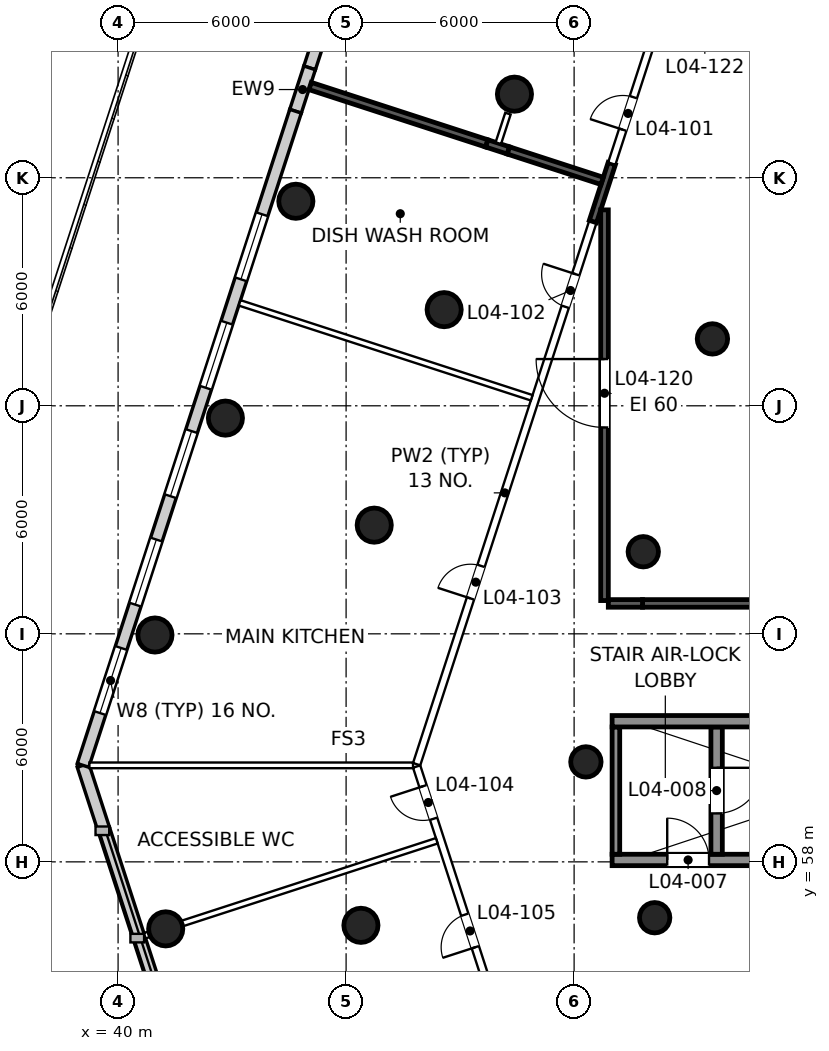
"""IFC4 building model, lengths in metres.
Left out: names, types, materials, properties, quantities, classifications, styles, units other than length and angle.
Written with IfcOpenShell. Run it as: python <this file> out.ifc"""

import sys

from ifc_helpers import new_model, si_unit, direction, frame, frame_2d, origin, origin_2d, place, context, subcontext, project, spatial, rectangle, circle, extrude, element, fill, save


model = new_model("IFC4")
c1 = context("Model", 3, precision=1e-05, world=origin(), true_north=direction((0.0, 1.0)))
c2 = subcontext(c1, "Body", "Model", "MODEL_VIEW")
j1 = project(units=[si_unit("LENGTHUNIT", "METRE"), si_unit("PLANEANGLEUNIT", "RADIAN")], contexts=[c1])
p1 = place(None, origin())
s1 = spatial("IfcSite", under=j1, at=p1, CompositionType="ELEMENT")
p2 = place(p1, origin())
s2 = spatial("IfcBuilding", under=s1, at=p2, CompositionType="ELEMENT")
p3 = place(p2, frame((0.0, 0.0, 29.0)))
s3 = spatial("IfcBuildingStorey", under=s2, at=p3, CompositionType="ELEMENT", Elevation=29.0)
for number, where, z_axis, x_axis in (
    (1, (46.39, 56.33, 0.0), (0.0, 0.0, 1.0), (1.0, 0.0, 0.0)),
    (2, (50.43, 78.2, 0.0), (0.0, 0.0, 1.0), (1.0, 0.0, 0.0)),
    (3, (48.58, 72.53, 0.0), (0.0, 0.0, 1.0), (1.0, 0.0, 0.0)),
    (4, (46.74, 66.86, 0.0), (0.0, 0.0, 1.0), (1.0, 0.0, 0.0)),
):
    element("IfcColumn", number, at=place(p3, frame(where, z_axis=z_axis, x_axis=x_axis)), inside=s3, PredefinedType="COLUMN", context=c2, shape_type="SweptSolid", body=[
        extrude(circle(Radius=0.45, at=origin_2d()), origin(), (0.0, 0.0, 1.0), 5.0),
    ])
for number, where, z_axis, x_axis in (
    (5, (52.31, 60.63, 0.0), (0.0, 0.0, 1.0), (1.0, 0.0, 0.0)),
    (6, (54.12, 56.53, 0.0), (0.0, 0.0, 1.0), (1.0, 0.0, 0.0)),
    (7, (55.64, 71.76, 0.0), (0.0, 0.0, 1.0), (1.0, 0.0, 0.0)),
    (8, (53.82, 66.16, 0.0), (0.0, 0.0, 1.0), (1.0, 0.0, 0.0)),
):
    element("IfcColumn", number, at=place(p3, frame(where, z_axis=z_axis, x_axis=x_axis)), inside=s3, PredefinedType="COLUMN", context=c2, shape_type="SweptSolid", body=[
        extrude(circle(Radius=0.4, at=origin_2d()), origin(), (0.0, 0.0, 1.0), 5.0),
    ])
for number, where, z_axis, x_axis in (
    (9, (41.253, 56.237, 0.0), (0.0, 0.0, 1.0), (1.0, 0.0, 0.0)),
    (10, (44.678, 75.382, 0.0), (0.0, 0.0, 1.0), (1.0, 0.0, 0.0)),
    (11, (42.824, 69.676, 0.0), (0.0, 0.0, 1.0), (1.0, 0.0, 0.0)),
    (12, (40.97, 63.969, 0.0), (0.0, 0.0, 1.0), (1.0, 0.0, 0.0)),
):
    element("IfcColumn", number, at=place(p3, frame(where, z_axis=z_axis, x_axis=x_axis)), inside=s3, PredefinedType="COLUMN", context=c2, shape_type="SweptSolid", body=[
        extrude(circle(Radius=0.45, at=origin_2d()), origin(), (0.0, 0.0, 1.0), 5.0),
    ])
p4 = place(p3, frame((39.077, 60.539, 0.0), z_axis=(0.0, 0.0, 1.0), x_axis=(0.309036002497, -0.951050339972, 0.0)))
e13 = element("IfcWall", 13, at=p4, inside=s3, PredefinedType="SOLIDWALL", context=c2, shape_type="SweptSolid", body=[
    extrude(rectangle(XDim=1.764, YDim=0.32, at=frame_2d((0.882, 0.0))), origin(), (0.0, 0.0, 1.0), 4.65),
])
p5 = place(p3, frame((39.622, 58.861, 0.0), z_axis=(0.0, 0.0, 1.0), x_axis=(0.309000197986, -0.951061973609, 0.0)))
e14 = element("IfcWall", 14, at=p5, inside=s3, PredefinedType="SOLIDWALL", context=c2, shape_type="SweptSolid", body=[
    extrude(rectangle(XDim=9.0, YDim=0.32, at=frame_2d((4.5, 0.0))), origin(), (0.0, 0.0, 1.0), 0.9),
])
p6 = place(p3, frame((47.017, 84.976, 0.0), z_axis=(0.0, 0.0, 1.0), x_axis=(-0.309028251378, -0.9510528586, 0.0)))
e15 = element("IfcWall", 15, at=p6, inside=s3, PredefinedType="SOLIDWALL", context=c2, shape_type="SweptSolid", body=[
    extrude(rectangle(XDim=6.397, YDim=0.32, at=frame_2d((3.198, 0.0))), origin(), (0.0, 0.0, 1.0), 4.65),
])
p7 = place(p6, frame((1.447, 0.0, 0.9)))
e16 = element("IfcOpeningElement", 16, at=p7, cuts=e15, PredefinedType="OPENING", context=c2, shape_type="SweptSolid", body=[
    extrude(rectangle(XDim=1.8, YDim=2.1, at=frame_2d((0.9, 1.05))), frame((0.0, 0.17, 0.0), z_axis=(0.0, -1.0, 0.0), x_axis=(1.0, 0.0, 0.0)), (0.0, 0.0, 1.0), 0.34),
])
p8 = place(p3, frame((45.04, 78.892, 0.0), z_axis=(0.0, 0.0, 1.0), x_axis=(-0.309017071679, -0.951056491178, 0.0)))
e17 = element("IfcWall", 17, at=p8, inside=s3, PredefinedType="SOLIDWALL", context=c2, shape_type="SweptSolid", body=[
    extrude(rectangle(XDim=1.2, YDim=0.32, at=frame_2d((0.6, 0.0))), origin(), (0.0, 0.0, 1.0), 4.65),
])
p9 = place(p3, frame((44.669, 77.751, 0.0), z_axis=(0.0, 0.0, 1.0), x_axis=(-0.309010726546, -0.951058552813, 0.0)))
e18 = element("IfcWall", 18, at=p9, inside=s3, PredefinedType="SOLIDWALL", context=c2, shape_type="SweptSolid", body=[
    extrude(rectangle(XDim=18.097, YDim=0.32, at=frame_2d((9.049, 0.0))), origin(), (0.0, 0.0, 1.0), 4.65),
])
p10 = place(p9, frame((2.85, 0.0, 0.9)))
e19 = element("IfcOpeningElement", 19, at=p10, cuts=e18, PredefinedType="OPENING", context=c2, shape_type="SweptSolid", body=[
    extrude(rectangle(XDim=1.8, YDim=2.1, at=frame_2d((0.9, 1.05))), frame((0.0, 0.17, 0.0), z_axis=(0.0, -1.0, 0.0), x_axis=(1.0, 0.0, 0.0)), (0.0, 0.0, 1.0), 0.34),
])
p11 = place(p9, frame((5.85, 0.0, 0.9)))
e20 = element("IfcOpeningElement", 20, at=p11, cuts=e18, PredefinedType="OPENING", context=c2, shape_type="SweptSolid", body=[
    extrude(rectangle(XDim=1.8, YDim=2.1, at=frame_2d((0.9, 1.05))), frame((0.0, 0.17, 0.0), z_axis=(0.0, -1.0, 0.0), x_axis=(1.0, 0.0, 0.0)), (0.0, 0.0, 1.0), 0.34),
])
p12 = place(p9, frame((8.85, 0.0, 0.9)))
e21 = element("IfcOpeningElement", 21, at=p12, cuts=e18, PredefinedType="OPENING", context=c2, shape_type="SweptSolid", body=[
    extrude(rectangle(XDim=1.8, YDim=2.1, at=frame_2d((0.9, 1.05))), frame((0.0, 0.17, 0.0), z_axis=(0.0, -1.0, 0.0), x_axis=(1.0, 0.0, 0.0)), (0.0, 0.0, 1.0), 0.34),
])
p13 = place(p9, frame((11.85, 0.0, 0.9)))
e22 = element("IfcOpeningElement", 22, at=p13, cuts=e18, PredefinedType="OPENING", context=c2, shape_type="SweptSolid", body=[
    extrude(rectangle(XDim=1.8, YDim=2.1, at=frame_2d((0.9, 1.05))), frame((0.0, 0.17, 0.0), z_axis=(0.0, -1.0, 0.0), x_axis=(1.0, 0.0, 0.0)), (0.0, 0.0, 1.0), 0.34),
])
p14 = place(p9, frame((14.85, 0.0, 0.9)))
e23 = element("IfcOpeningElement", 23, at=p14, cuts=e18, PredefinedType="OPENING", context=c2, shape_type="SweptSolid", body=[
    extrude(rectangle(XDim=1.8, YDim=2.1, at=frame_2d((0.9, 1.05))), frame((0.0, 0.17, 0.0), z_axis=(0.0, -1.0, 0.0), x_axis=(1.0, 0.0, 0.0)), (0.0, 0.0, 1.0), 0.34),
])
p15 = place(p3, frame((53.0, 58.05, 0.0), z_axis=(0.0, 0.0, 1.0), x_axis=(1.0, 0.0, 0.0)))
e24 = element("IfcWall", 24, at=p15, inside=s3, PredefinedType="SHEAR", context=c2, shape_type="SweptSolid", body=[
    extrude(rectangle(XDim=11.9, YDim=0.3, at=frame_2d((5.95, 0.0))), origin(), (0.0, 0.0, 1.0), 5.0),
])
p16 = place(p15, frame((1.45, 0.0, 0.0)))
e25 = element("IfcOpeningElement", 25, at=p16, cuts=e24, PredefinedType="OPENING", context=c2, shape_type="SweptSolid", body=[
    extrude(rectangle(XDim=1.1, YDim=2.1, at=frame_2d((0.55, 1.05))), frame((0.0, 0.16, 0.0), z_axis=(0.0, -1.0, 0.0), x_axis=(1.0, 0.0, 0.0)), (0.0, 0.0, 1.0), 0.32),
])
p17 = place(p3, frame((53.1, 58.2, 0.0), z_axis=(0.0, 0.0, 1.0), x_axis=(0.0, 1.0, 0.0)))
e26 = element("IfcWall", 26, at=p17, inside=s3, PredefinedType="SHEAR", context=c2, shape_type="SweptSolid", body=[
    extrude(rectangle(XDim=3.35, YDim=0.2, at=frame_2d((1.675, 0.0))), origin(), (0.0, 0.0, 1.0), 5.0),
])
p18 = place(p3, frame((55.75, 58.2, 0.0), z_axis=(0.0, 0.0, 1.0), x_axis=(0.0, 1.0, 0.0)))
e27 = element("IfcWall", 27, at=p18, inside=s3, PredefinedType="SHEAR", context=c2, shape_type="SweptSolid", body=[
    extrude(rectangle(XDim=3.35, YDim=0.3, at=frame_2d((1.675, 0.0))), origin(), (0.0, 0.0, 1.0), 5.0),
])
p19 = place(p18, frame((1.075, 0.0, 0.0)))
e28 = element("IfcOpeningElement", 28, at=p19, cuts=e27, PredefinedType="OPENING", context=c2, shape_type="SweptSolid", body=[
    extrude(rectangle(XDim=1.2, YDim=2.1, at=frame_2d((0.6, 1.05))), frame((0.0, 0.16, 0.0), z_axis=(0.0, -1.0, 0.0), x_axis=(1.0, 0.0, 0.0)), (0.0, 0.0, 1.0), 0.32),
])
p20 = place(p3, frame((53.0, 61.7, 0.0), z_axis=(0.0, 0.0, 1.0), x_axis=(1.0, 0.0, 0.0)))
e29 = element("IfcWall", 29, at=p20, inside=s3, PredefinedType="SHEAR", context=c2, shape_type="SweptSolid", body=[
    extrude(rectangle(XDim=11.9, YDim=0.3, at=frame_2d((5.95, 0.0))), origin(), (0.0, 0.0, 1.0), 5.0),
])
p21 = place(p3, frame((50.033, 53.809, 0.0), z_axis=(0.0, 0.0, 1.0), x_axis=(-0.309023375149, 0.951054443032, 0.0)))
e30 = element("IfcWall", 30, at=p21, inside=s3, PredefinedType="PARTITIONING", context=c2, shape_type="SweptSolid", body=[
    extrude(rectangle(XDim=7.044, YDim=0.2, at=frame_2d((3.522, 0.0))), origin(), (0.0, 0.0, 1.0), 4.65),
])
p22 = place(p21, frame((5.599, 0.0, 0.0)))
e31 = element("IfcOpeningElement", 31, at=p22, cuts=e30, PredefinedType="OPENING", context=c2, shape_type="SweptSolid", body=[
    extrude(rectangle(XDim=0.9, YDim=2.1, at=frame_2d((0.45, 1.05))), frame((0.0, 0.11, 0.0), z_axis=(0.0, -1.0, 0.0), x_axis=(1.0, 0.0, 0.0)), (0.0, 0.0, 1.0), 0.22),
])
p23 = place(p21, frame((2.045, 0.0, 0.0)))
e32 = element("IfcOpeningElement", 32, at=p23, cuts=e30, PredefinedType="OPENING", context=c2, shape_type="SweptSolid", body=[
    extrude(rectangle(XDim=0.9, YDim=2.1, at=frame_2d((0.45, 1.05))), frame((0.0, 0.11, 0.0), z_axis=(0.0, -1.0, 0.0), x_axis=(1.0, 0.0, 0.0)), (0.0, 0.0, 1.0), 0.22),
])
p24 = place(p3, frame((47.856, 60.57, 0.0), z_axis=(0.0, 0.0, 1.0), x_axis=(0.309027605618, 0.951053068428, 0.0)))
e33 = element("IfcWall", 33, at=p24, inside=s3, PredefinedType="PARTITIONING", context=c2, shape_type="SweptSolid", body=[
    extrude(rectangle(XDim=15.013, YDim=0.2, at=frame_2d((7.506, 0.0))), origin(), (0.0, 0.0, 1.0), 4.65),
])
p25 = place(p24, frame((12.655, 0.0, 0.0)))
e34 = element("IfcOpeningElement", 34, at=p25, cuts=e33, PredefinedType="OPENING", context=c2, shape_type="SweptSolid", body=[
    extrude(rectangle(XDim=0.9, YDim=2.1, at=frame_2d((0.45, 1.05))), frame((0.0, 0.11, 0.0), z_axis=(0.0, -1.0, 0.0), x_axis=(1.0, 0.0, 0.0)), (0.0, 0.0, 1.0), 0.22),
])
p26 = place(p24, frame((4.586, 0.0, 0.0)))
e35 = element("IfcOpeningElement", 35, at=p26, cuts=e33, PredefinedType="OPENING", context=c2, shape_type="SweptSolid", body=[
    extrude(rectangle(XDim=0.9, YDim=2.1, at=frame_2d((0.45, 1.05))), frame((0.0, 0.11, 0.0), z_axis=(0.0, -1.0, 0.0), x_axis=(1.0, 0.0, 0.0)), (0.0, 0.0, 1.0), 0.22),
])
p27 = place(p3, frame((52.496, 74.848, 0.0), z_axis=(0.0, 0.0, 1.0), x_axis=(0.308958737343, 0.95107544318, 0.0)))
e36 = element("IfcWall", 36, at=p27, inside=s3, PredefinedType="PARTITIONING", context=c2, shape_type="SweptSolid", body=[
    extrude(rectangle(XDim=1.604, YDim=0.2, at=frame_2d((0.802, 0.0))), origin(), (0.0, 0.0, 1.0), 4.65),
])
p28 = place(p3, frame((52.991, 76.374, 0.0), z_axis=(0.0, 0.0, 1.0), x_axis=(0.309041420656, 0.951048579369, 0.0)))
e37 = element("IfcWall", 37, at=p28, inside=s3, PredefinedType="PARTITIONING", context=c2, shape_type="SweptSolid", body=[
    extrude(rectangle(XDim=3.215, YDim=0.2, at=frame_2d((1.607, 0.0))), origin(), (0.0, 0.0, 1.0), 4.65),
])
p29 = place(p28, frame((0.938, 0.0, 0.0)))
e38 = element("IfcOpeningElement", 38, at=p29, cuts=e37, PredefinedType="OPENING", context=c2, shape_type="SweptSolid", body=[
    extrude(rectangle(XDim=0.9, YDim=2.1, at=frame_2d((0.45, 1.05))), frame((0.0, 0.11, 0.0), z_axis=(0.0, -1.0, 0.0), x_axis=(1.0, 0.0, 0.0)), (0.0, 0.0, 1.0), 0.22),
])
p30 = place(p3, frame((39.245, 60.539, 0.0), z_axis=(0.0, 0.0, 1.0), x_axis=(1.0, 0.0, 0.0)))
e39 = element("IfcWall", 39, at=p30, inside=s3, PredefinedType="PARTITIONING", context=c2, shape_type="SweptSolid", body=[
    extrude(rectangle(XDim=8.516, YDim=0.15, at=frame_2d((4.258, 0.0))), origin(), (0.0, 0.0, 1.0), 3.75),
])
p31 = place(p3, frame((45.053, 78.414, 0.0), z_axis=(0.0, 0.0, 1.0), x_axis=(0.95106819954, -0.308981034733, 0.0)))
e40 = element("IfcWall", 40, at=p31, inside=s3, PredefinedType="PARTITIONING", context=c2, shape_type="SweptSolid", body=[
    extrude(rectangle(XDim=4.888, YDim=0.2, at=frame_2d((2.444, 0.0))), origin(), (0.0, 0.0, 1.0), 4.65),
])
p32 = place(p3, frame((49.702, 76.904, 0.0), z_axis=(0.0, 0.0, 1.0), x_axis=(0.951022080269, -0.30912295748, 0.0)))
e41 = element("IfcWall", 41, at=p32, inside=s3, PredefinedType="PARTITIONING", context=c2, shape_type="SweptSolid", body=[
    extrude(rectangle(XDim=0.599, YDim=0.2, at=frame_2d((0.299, 0.0))), origin(), (0.0, 0.0, 1.0), 3.95),
])
p33 = place(p3, frame((50.271, 76.719, 0.0), z_axis=(0.0, 0.0, 1.0), x_axis=(0.951047211668, -0.309045629606, 0.0)))
e42 = element("IfcWall", 42, at=p33, inside=s3, PredefinedType="PARTITIONING", context=c2, shape_type="SweptSolid", body=[
    extrude(rectangle(XDim=2.594, YDim=0.2, at=frame_2d((1.297, 0.0))), origin(), (0.0, 0.0, 1.0), 4.65),
])
p34 = place(p3, frame((43.199, 72.708, 0.0), z_axis=(0.0, 0.0, 1.0), x_axis=(0.951058046839, -0.309012283804, 0.0)))
e43 = element("IfcWall", 43, at=p34, inside=s3, PredefinedType="PARTITIONING", context=c2, shape_type="SweptSolid", body=[
    extrude(rectangle(XDim=8.08, YDim=0.15, at=frame_2d((4.04, 0.0))), origin(), (0.0, 0.0, 1.0), 3.95),
])
p35 = place(p3, frame((40.701, 56.058, 0.0), z_axis=(0.0, 0.0, 1.0), x_axis=(0.951058046839, 0.309012283804, 0.0)))
e44 = element("IfcWall", 44, at=p35, inside=s3, PredefinedType="PARTITIONING", context=c2, shape_type="SweptSolid", body=[
    extrude(rectangle(XDim=8.08, YDim=0.15, at=frame_2d((4.04, 0.0))), origin(), (0.0, 0.0, 1.0), 3.75),
])
p36 = place(p3, frame((86.2, 64.8, 0.0), z_axis=(0.0, 0.0, 1.0), x_axis=(-1.0, 0.0, 0.0)))
e45 = element("IfcWall", 45, at=p36, inside=s3, PredefinedType="PARTITIONING", context=c2, shape_type="SweptSolid", body=[
    extrude(rectangle(XDim=32.4, YDim=0.2, at=frame_2d((16.2, 0.0))), origin(), (0.0, 0.0, 1.0), 4.65),
])
p37 = place(p36, frame((8.45, 0.0, 0.0)))
e46 = element("IfcOpeningElement", 46, at=p37, cuts=e45, PredefinedType="OPENING", context=c2, shape_type="SweptSolid", body=[
    extrude(rectangle(XDim=1.8, YDim=2.1, at=frame_2d((0.9, 1.05))), frame((0.0, 0.11, 0.0), z_axis=(0.0, -1.0, 0.0), x_axis=(1.0, 0.0, 0.0)), (0.0, 0.0, 1.0), 0.22),
])
p38 = place(p36, frame((22.15, 0.0, 0.0)))
e47 = element("IfcOpeningElement", 47, at=p38, cuts=e45, PredefinedType="OPENING", context=c2, shape_type="SweptSolid", body=[
    extrude(rectangle(XDim=1.8, YDim=2.1, at=frame_2d((0.9, 1.05))), frame((0.0, 0.11, 0.0), z_axis=(0.0, -1.0, 0.0), x_axis=(1.0, 0.0, 0.0)), (0.0, 0.0, 1.0), 0.22),
])
p39 = place(p3, frame((53.8, 64.8, 0.0), z_axis=(0.0, 0.0, 1.0), x_axis=(-1.0, 0.0, 0.0)))
e48 = element("IfcWall", 48, at=p39, inside=s3, PredefinedType="PARTITIONING", context=c2, shape_type="SweptSolid", body=[
    extrude(rectangle(XDim=0.9, YDim=0.2, at=frame_2d((0.45, 0.0))), origin(), (0.0, 0.0, 1.0), 3.85),
])
p40 = place(p3, frame((52.8, 64.875, 0.0), z_axis=(0.0, 0.0, 1.0), x_axis=(0.0, 1.0, 0.0)))
e49 = element("IfcWall", 49, at=p40, inside=s3, PredefinedType="PARTITIONING", context=c2, shape_type="SweptSolid", body=[
    extrude(rectangle(XDim=10.28, YDim=0.2, at=frame_2d((5.14, 0.0))), origin(), (0.0, 0.0, 1.0), 4.65),
])
p41 = place(p40, frame((4.555, 0.0, 0.0)))
e50 = element("IfcOpeningElement", 50, at=p41, cuts=e49, PredefinedType="OPENING", context=c2, shape_type="SweptSolid", body=[
    extrude(rectangle(XDim=1.8, YDim=2.1, at=frame_2d((0.9, 1.05))), frame((0.0, 0.11, 0.0), z_axis=(0.0, -1.0, 0.0), x_axis=(1.0, 0.0, 0.0)), (0.0, 0.0, 1.0), 0.22),
])
p42 = place(p3, frame((50.259, 77.688, 0.0), z_axis=(0.0, 0.0, 1.0), x_axis=(-0.309052312813, -0.951045039914, 0.0)))
e51 = element("IfcWall", 51, at=p42, inside=s3, PredefinedType="PARTITIONING", context=c2, shape_type="SweptSolid", body=[
    extrude(rectangle(XDim=0.818, YDim=0.15, at=frame_2d((0.409, 0.0))), origin(), (0.0, 0.0, 1.0), 3.95),
])
p43 = place(p10, origin())
e52 = element("IfcWindow", 52, at=p43, inside=s3, PartitioningType="SINGLE_PANEL", PredefinedType="WINDOW", context=c2, shape_type="SweptSolid", body=[
    extrude(rectangle(XDim=1.8, YDim=2.1, at=frame_2d((0.9, 1.05))), frame((0.0, 0.07, 0.0), z_axis=(0.0, -1.0, 0.0), x_axis=(1.0, 0.0, 0.0)), (0.0, 0.0, 1.0), 0.06),
])
fill(e19, e52)
p44 = place(p11, origin())
e53 = element("IfcWindow", 53, at=p44, inside=s3, PartitioningType="SINGLE_PANEL", PredefinedType="WINDOW", context=c2, shape_type="SweptSolid", body=[
    extrude(rectangle(XDim=1.8, YDim=2.1, at=frame_2d((0.9, 1.05))), frame((0.0, 0.07, 0.0), z_axis=(0.0, -1.0, 0.0), x_axis=(1.0, 0.0, 0.0)), (0.0, 0.0, 1.0), 0.06),
])
fill(e20, e53)
p45 = place(p12, origin())
e54 = element("IfcWindow", 54, at=p45, inside=s3, PartitioningType="SINGLE_PANEL", PredefinedType="WINDOW", context=c2, shape_type="SweptSolid", body=[
    extrude(rectangle(XDim=1.8, YDim=2.1, at=frame_2d((0.9, 1.05))), frame((0.0, 0.07, 0.0), z_axis=(0.0, -1.0, 0.0), x_axis=(1.0, 0.0, 0.0)), (0.0, 0.0, 1.0), 0.06),
])
fill(e21, e54)
p46 = place(p13, origin())
e55 = element("IfcWindow", 55, at=p46, inside=s3, PartitioningType="SINGLE_PANEL", PredefinedType="WINDOW", context=c2, shape_type="SweptSolid", body=[
    extrude(rectangle(XDim=1.8, YDim=2.1, at=frame_2d((0.9, 1.05))), frame((0.0, 0.07, 0.0), z_axis=(0.0, -1.0, 0.0), x_axis=(1.0, 0.0, 0.0)), (0.0, 0.0, 1.0), 0.06),
])
fill(e22, e55)
p47 = place(p14, origin())
e56 = element("IfcWindow", 56, at=p47, inside=s3, PartitioningType="SINGLE_PANEL", PredefinedType="WINDOW", context=c2, shape_type="SweptSolid", body=[
    extrude(rectangle(XDim=1.8, YDim=2.1, at=frame_2d((0.9, 1.05))), frame((0.0, 0.07, 0.0), z_axis=(0.0, -1.0, 0.0), x_axis=(1.0, 0.0, 0.0)), (0.0, 0.0, 1.0), 0.06),
])
fill(e23, e56)
p48 = place(p16, origin())
e57 = element("IfcDoor", 57, at=p48, inside=s3, OperationType="SINGLE_SWING_LEFT", PredefinedType="DOOR", context=c2, shape_type="SweptSolid", body=[
    extrude(rectangle(XDim=1.1, YDim=2.1, at=frame_2d((0.55, 1.05))), frame((0.0, 0.025, 0.0), z_axis=(0.0, -1.0, 0.0), x_axis=(1.0, 0.0, 0.0)), (0.0, 0.0, 1.0), 0.05),
])
fill(e25, e57)
p49 = place(p19, frame((1.2, 0.0, 0.0), z_axis=(0.0, 0.0, 1.0), x_axis=(-1.0, 0.0, 0.0)))
e58 = element("IfcDoor", 58, at=p49, inside=s3, OperationType="SINGLE_SWING_LEFT", PredefinedType="DOOR", context=c2, shape_type="SweptSolid", body=[
    extrude(rectangle(XDim=1.2, YDim=2.1, at=frame_2d((0.6, 1.05))), frame((0.0, 0.025, 0.0), z_axis=(0.0, -1.0, 0.0), x_axis=(1.0, 0.0, 0.0)), (0.0, 0.0, 1.0), 0.05),
])
fill(e28, e58)
p50 = place(p29, origin())
e59 = element("IfcDoor", 59, at=p50, inside=s3, OperationType="SINGLE_SWING_LEFT", PredefinedType="DOOR", context=c2, shape_type="SweptSolid", body=[
    extrude(rectangle(XDim=0.9, YDim=2.1, at=frame_2d((0.45, 1.05))), frame((0.0, 0.025, 0.0), z_axis=(0.0, -1.0, 0.0), x_axis=(1.0, 0.0, 0.0)), (0.0, 0.0, 1.0), 0.05),
])
fill(e38, e59)
p51 = place(p25, origin())
e60 = element("IfcDoor", 60, at=p51, inside=s3, OperationType="SINGLE_SWING_RIGHT", PredefinedType="DOOR", context=c2, shape_type="SweptSolid", body=[
    extrude(rectangle(XDim=0.9, YDim=2.1, at=frame_2d((0.45, 1.05))), frame((0.0, 0.025, 0.0), z_axis=(0.0, -1.0, 0.0), x_axis=(1.0, 0.0, 0.0)), (0.0, 0.0, 1.0), 0.05),
])
fill(e34, e60)
p52 = place(p26, origin())
e61 = element("IfcDoor", 61, at=p52, inside=s3, OperationType="SINGLE_SWING_LEFT", PredefinedType="DOOR", context=c2, shape_type="SweptSolid", body=[
    extrude(rectangle(XDim=0.9, YDim=2.1, at=frame_2d((0.45, 1.05))), frame((0.0, 0.025, 0.0), z_axis=(0.0, -1.0, 0.0), x_axis=(1.0, 0.0, 0.0)), (0.0, 0.0, 1.0), 0.05),
])
fill(e35, e61)
p53 = place(p22, origin())
e62 = element("IfcDoor", 62, at=p53, inside=s3, OperationType="SINGLE_SWING_RIGHT", PredefinedType="DOOR", context=c2, shape_type="SweptSolid", body=[
    extrude(rectangle(XDim=0.9, YDim=2.1, at=frame_2d((0.45, 1.05))), frame((0.0, 0.025, 0.0), z_axis=(0.0, -1.0, 0.0), x_axis=(1.0, 0.0, 0.0)), (0.0, 0.0, 1.0), 0.05),
])
fill(e31, e62)
p54 = place(p23, origin())
e63 = element("IfcDoor", 63, at=p54, inside=s3, OperationType="SINGLE_SWING_LEFT", PredefinedType="DOOR", context=c2, shape_type="SweptSolid", body=[
    extrude(rectangle(XDim=0.9, YDim=2.1, at=frame_2d((0.45, 1.05))), frame((0.0, 0.025, 0.0), z_axis=(0.0, -1.0, 0.0), x_axis=(1.0, 0.0, 0.0)), (0.0, 0.0, 1.0), 0.05),
])
fill(e32, e63)
p55 = place(p41, origin())
e64 = element("IfcDoor", 64, at=p55, inside=s3, OperationType="DOUBLE_DOOR_SINGLE_SWING", PredefinedType="DOOR", context=c2, shape_type="SweptSolid", body=[
    extrude(rectangle(XDim=1.8, YDim=2.1, at=frame_2d((0.9, 1.05))), frame((0.0, 0.025, 0.0), z_axis=(0.0, -1.0, 0.0), x_axis=(1.0, 0.0, 0.0)), (0.0, 0.0, 1.0), 0.05),
])
fill(e50, e64)
save(model, sys.argv[1])
